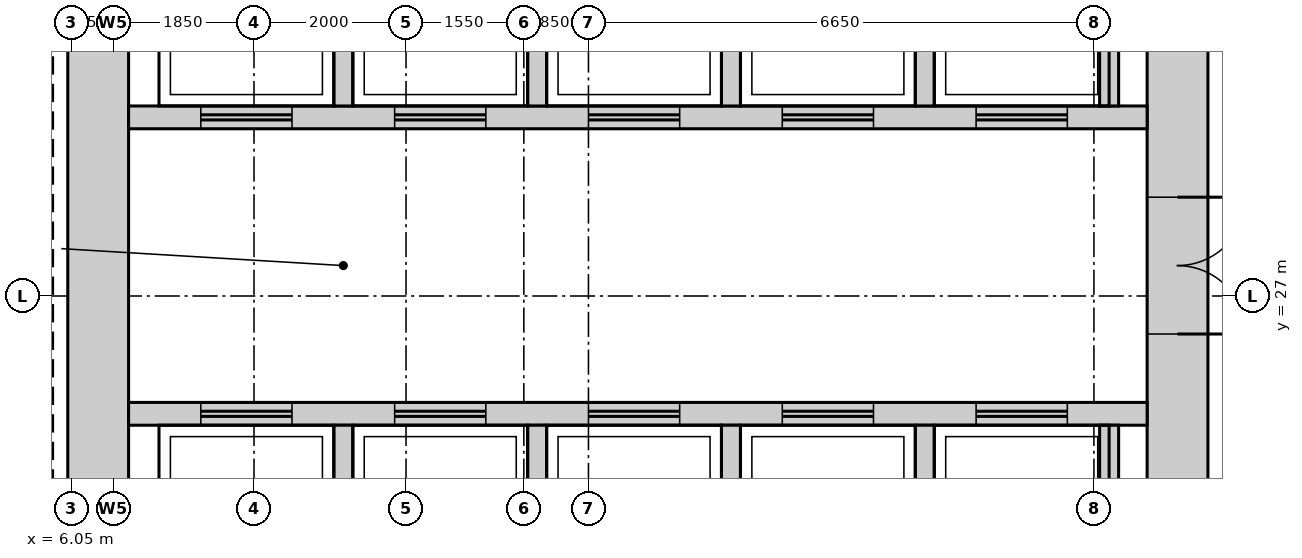
"""IFC4 building model, lengths in metres.
Left out: names, types, materials, properties, quantities, classifications, styles, units other than length and angle.
Written with IfcOpenShell. Run it as: python <this file> out.ifc"""

import sys

from ifc_helpers import new_model, si_unit, direction, frame, frame_2d, origin, place, context, subcontext, project, spatial, rectangle, extrude, source, transform, mapped, element, fill, save


model = new_model("IFC4")
c1 = context("Model", 3, precision=1e-05, world=origin(), true_north=direction((0.0, 1.0)))
c2 = subcontext(c1, "Body", "Model", "MODEL_VIEW")
j1 = project(units=[si_unit("LENGTHUNIT", "METRE"), si_unit("PLANEANGLEUNIT", "RADIAN")], contexts=[c1])
p1 = place(None, origin())
s1 = spatial("IfcSite", under=j1, at=p1, CompositionType="ELEMENT")
p2 = place(p1, origin())
s2 = spatial("IfcBuilding", under=s1, at=p2, CompositionType="ELEMENT")
p3 = place(p2, frame((0.0, 0.0, 168.7)))
s3 = spatial("IfcBuildingStorey", under=s2, at=p3, CompositionType="ELEMENT", Elevation=168.7)
m1 = source(origin(), c2, "Body", "SweptSolid", [
    extrude(rectangle(XDim=22.4, YDim=0.8, at=frame_2d((11.2, 0.0))), origin(), (0.0, 0.0, 1.0), 3.75),
])
p4 = place(p3, frame((20.6, 15.8, 0.0), z_axis=(0.0, 0.0, 1.0), x_axis=(0.0, 1.0, 0.0)))
e1 = element("IfcWall", 1, at=p4, inside=s3, PredefinedType="SHEAR", context=c2, shape_type="MappedRepresentation", body=[
    mapped(m1, transform((0.0, 0.0, 0.0))),
])
m2 = source(origin(), c2, "Body", "SweptSolid", [
    extrude(rectangle(XDim=1.8, YDim=2.1, at=frame_2d((0.9, 1.05))), frame((0.0, 0.41, 0.0), z_axis=(0.0, -1.0, 0.0), x_axis=(1.0, 0.0, 0.0)), (0.0, 0.0, 1.0), 0.82),
])
p5 = place(p4, frame((10.7, 0.0, 0.0)))
e2 = element("IfcOpeningElement", 2, at=p5, cuts=e1, PredefinedType="OPENING", context=c2, shape_type="MappedRepresentation", body=[
    mapped(m2, transform((0.0, 0.0, 0.0))),
])
m3 = source(origin(), c2, "Body", "SweptSolid", [
    extrude(rectangle(XDim=0.9, YDim=2.1, at=frame_2d((0.45, 1.05))), frame((0.0, 0.41, 0.0), z_axis=(0.0, -1.0, 0.0), x_axis=(1.0, 0.0, 0.0)), (0.0, 0.0, 1.0), 0.82),
])
p6 = place(p4, frame((0.35, 0.0, 0.0)))
e3 = element("IfcOpeningElement", 3, at=p6, cuts=e1, PredefinedType="OPENING", context=c2, shape_type="MappedRepresentation", body=[
    mapped(m3, transform((0.0, 0.0, 0.0))),
])
p7 = place(p4, frame((2.8, 0.0, 0.0)))
e4 = element("IfcOpeningElement", 4, at=p7, cuts=e1, PredefinedType="OPENING", context=c2, shape_type="MappedRepresentation", body=[
    mapped(m3, transform((0.0, 0.0, 0.0))),
])
p8 = place(p4, frame((5.55, 0.0, 0.0)))
e5 = element("IfcOpeningElement", 5, at=p8, cuts=e1, PredefinedType="OPENING", context=c2, shape_type="MappedRepresentation", body=[
    mapped(m3, transform((0.0, 0.0, 0.0))),
])
p9 = place(p3, frame((6.4, 15.8, 0.0), z_axis=(0.0, 0.0, 1.0), x_axis=(0.0, 1.0, 0.0)))
e6 = element("IfcWall", 6, at=p9, inside=s3, PredefinedType="SHEAR", context=c2, shape_type="MappedRepresentation", body=[
    mapped(m1, transform((0.0, 0.0, 0.0))),
])
m4 = source(origin(), c2, "Body", "SweptSolid", [
    extrude(rectangle(XDim=13.4, YDim=0.3, at=frame_2d((6.7, 0.0))), origin(), (0.0, 0.0, 1.0), 3.75),
])
p10 = place(p3, frame((6.8, 29.35, 0.0), z_axis=(0.0, 0.0, 1.0), x_axis=(1.0, 0.0, 0.0)))
e7 = element("IfcWall", 7, at=p10, inside=s3, PredefinedType="STANDARD", context=c2, shape_type="MappedRepresentation", body=[
    mapped(m4, transform((0.0, 0.0, 0.0))),
])
m5 = source(origin(), c2, "Body", "SweptSolid", [
    extrude(rectangle(XDim=1.2, YDim=2.1, at=frame_2d((0.6, 1.05))), frame((0.0, 0.16, 0.0), z_axis=(0.0, -1.0, 0.0), x_axis=(1.0, 0.0, 0.0)), (0.0, 0.0, 1.0), 0.32),
])
p11 = place(p10, frame((0.95, 0.0, 0.0)))
e8 = element("IfcOpeningElement", 8, at=p11, cuts=e7, PredefinedType="OPENING", context=c2, shape_type="MappedRepresentation", body=[
    mapped(m5, transform((0.0, 0.0, 0.0))),
])
p12 = place(p10, frame((3.5, 0.0, 0.0)))
e9 = element("IfcOpeningElement", 9, at=p12, cuts=e7, PredefinedType="OPENING", context=c2, shape_type="MappedRepresentation", body=[
    mapped(m5, transform((0.0, 0.0, 0.0))),
])
p13 = place(p10, frame((6.05, 0.0, 0.0)))
e10 = element("IfcOpeningElement", 10, at=p13, cuts=e7, PredefinedType="OPENING", context=c2, shape_type="MappedRepresentation", body=[
    mapped(m5, transform((0.0, 0.0, 0.0))),
])
p14 = place(p10, frame((8.6, 0.0, 0.0)))
e11 = element("IfcOpeningElement", 11, at=p14, cuts=e7, PredefinedType="OPENING", context=c2, shape_type="MappedRepresentation", body=[
    mapped(m5, transform((0.0, 0.0, 0.0))),
])
p15 = place(p10, frame((11.15, 0.0, 0.0)))
e12 = element("IfcOpeningElement", 12, at=p15, cuts=e7, PredefinedType="OPENING", context=c2, shape_type="MappedRepresentation", body=[
    mapped(m5, transform((0.0, 0.0, 0.0))),
])
p16 = place(p3, frame((6.8, 25.45, 0.0), z_axis=(0.0, 0.0, 1.0), x_axis=(1.0, 0.0, 0.0)))
e13 = element("IfcWall", 13, at=p16, inside=s3, PredefinedType="STANDARD", context=c2, shape_type="MappedRepresentation", body=[
    mapped(m4, transform((0.0, 0.0, 0.0))),
])
p17 = place(p16, frame((0.95, 0.0, 0.0)))
e14 = element("IfcOpeningElement", 14, at=p17, cuts=e13, PredefinedType="OPENING", context=c2, shape_type="MappedRepresentation", body=[
    mapped(m5, transform((0.0, 0.0, 0.0))),
])
p18 = place(p16, frame((3.5, 0.0, 0.0)))
e15 = element("IfcOpeningElement", 15, at=p18, cuts=e13, PredefinedType="OPENING", context=c2, shape_type="MappedRepresentation", body=[
    mapped(m5, transform((0.0, 0.0, 0.0))),
])
p19 = place(p16, frame((6.05, 0.0, 0.0)))
e16 = element("IfcOpeningElement", 16, at=p19, cuts=e13, PredefinedType="OPENING", context=c2, shape_type="MappedRepresentation", body=[
    mapped(m5, transform((0.0, 0.0, 0.0))),
])
p20 = place(p16, frame((8.6, 0.0, 0.0)))
e17 = element("IfcOpeningElement", 17, at=p20, cuts=e13, PredefinedType="OPENING", context=c2, shape_type="MappedRepresentation", body=[
    mapped(m5, transform((0.0, 0.0, 0.0))),
])
p21 = place(p16, frame((11.15, 0.0, 0.0)))
e18 = element("IfcOpeningElement", 18, at=p21, cuts=e13, PredefinedType="OPENING", context=c2, shape_type="MappedRepresentation", body=[
    mapped(m5, transform((0.0, 0.0, 0.0))),
])
m6 = source(origin(), c2, "Body", "SweptSolid", [
    extrude(rectangle(XDim=2.4, YDim=0.25, at=frame_2d((1.2, 0.0))), origin(), (0.0, 0.0, 1.0), 3.75),
])
for number, where, z_axis, x_axis in (
    (19, (17.275, 29.5, 0.0), (0.0, 0.0, 1.0), (0.0, 1.0, 0.0)),
    (20, (19.7, 29.5, 0.0), (0.0, 0.0, 1.0), (0.0, 1.0, 0.0)),
    (21, (9.625, 29.5, 0.0), (0.0, 0.0, 1.0), (0.0, 1.0, 0.0)),
    (22, (12.175, 29.5, 0.0), (0.0, 0.0, 1.0), (0.0, 1.0, 0.0)),
    (23, (14.725, 29.5, 0.0), (0.0, 0.0, 1.0), (0.0, 1.0, 0.0)),
):
    element("IfcWall", number, at=place(p3, frame(where, z_axis=z_axis, x_axis=x_axis)), inside=s3, PredefinedType="STANDARD", context=c2, shape_type="MappedRepresentation", body=[
        mapped(m6, transform((0.0, 0.0, 0.0))),
    ])
m7 = source(origin(), c2, "Body", "SweptSolid", [
    extrude(rectangle(XDim=2.4, YDim=0.25, at=frame_2d((1.2, 0.0))), origin(), (0.0, 0.0, 1.0), 3.75),
])
for number, where, z_axis, x_axis in (
    (24, (17.275, 22.9, 0.0), (0.0, 0.0, 1.0), (0.0, 1.0, 0.0)),
    (25, (19.7, 22.9, 0.0), (0.0, 0.0, 1.0), (0.0, 1.0, 0.0)),
    (26, (9.625, 22.9, 0.0), (0.0, 0.0, 1.0), (0.0, 1.0, 0.0)),
    (27, (12.175, 22.9, 0.0), (0.0, 0.0, 1.0), (0.0, 1.0, 0.0)),
    (28, (14.725, 22.9, 0.0), (0.0, 0.0, 1.0), (0.0, 1.0, 0.0)),
):
    element("IfcWall", number, at=place(p3, frame(where, z_axis=z_axis, x_axis=x_axis)), inside=s3, PredefinedType="STANDARD", context=c2, shape_type="MappedRepresentation", body=[
        mapped(m7, transform((0.0, 0.0, 0.0))),
    ])
m8 = source(origin(), c2, "Body", "SweptSolid", [
    extrude(rectangle(XDim=1.8, YDim=2.1, at=frame_2d((0.9, 1.05))), frame((0.0, 0.35, 0.0), z_axis=(0.0, -1.0, 0.0), x_axis=(1.0, 0.0, 0.0)), (0.0, 0.0, 1.0), 0.7),
])
p22 = place(p5, origin())
e29 = element("IfcDoor", 29, at=p22, inside=s3, OperationType="DOUBLE_DOOR_SINGLE_SWING", PredefinedType="DOOR", context=c2, shape_type="MappedRepresentation", body=[
    mapped(m8, transform((0.0, 0.0, 0.0))),
])
fill(e2, e29)
m9 = source(origin(), c2, "Body", "SweptSolid", [
    extrude(rectangle(XDim=1.2, YDim=2.1, at=frame_2d((0.6, 1.05))), frame((0.0, 0.025, 0.0), z_axis=(0.0, -1.0, 0.0), x_axis=(1.0, 0.0, 0.0)), (0.0, 0.0, 1.0), 0.05),
])
p23 = place(p17, origin())
e30 = element("IfcDoor", 30, at=p23, inside=s3, OperationType="DOUBLE_DOOR_SLIDING", PredefinedType="DOOR", context=c2, shape_type="MappedRepresentation", body=[
    mapped(m9, transform((0.0, 0.0, 0.0))),
])
fill(e14, e30)
p24 = place(p18, origin())
e31 = element("IfcDoor", 31, at=p24, inside=s3, OperationType="DOUBLE_DOOR_SLIDING", PredefinedType="DOOR", context=c2, shape_type="MappedRepresentation", body=[
    mapped(m9, transform((0.0, 0.0, 0.0))),
])
fill(e15, e31)
p25 = place(p19, origin())
e32 = element("IfcDoor", 32, at=p25, inside=s3, OperationType="DOUBLE_DOOR_SLIDING", PredefinedType="DOOR", context=c2, shape_type="MappedRepresentation", body=[
    mapped(m9, transform((0.0, 0.0, 0.0))),
])
fill(e16, e32)
p26 = place(p20, origin())
e33 = element("IfcDoor", 33, at=p26, inside=s3, OperationType="DOUBLE_DOOR_SLIDING", PredefinedType="DOOR", context=c2, shape_type="MappedRepresentation", body=[
    mapped(m9, transform((0.0, 0.0, 0.0))),
])
fill(e17, e33)
p27 = place(p21, origin())
e34 = element("IfcDoor", 34, at=p27, inside=s3, OperationType="DOUBLE_DOOR_SLIDING", PredefinedType="DOOR", context=c2, shape_type="MappedRepresentation", body=[
    mapped(m9, transform((0.0, 0.0, 0.0))),
])
fill(e18, e34)
p28 = place(p11, origin())
e35 = element("IfcDoor", 35, at=p28, inside=s3, OperationType="DOUBLE_DOOR_SLIDING", PredefinedType="DOOR", context=c2, shape_type="MappedRepresentation", body=[
    mapped(m9, transform((0.0, 0.0, 0.0))),
])
fill(e8, e35)
p29 = place(p12, origin())
e36 = element("IfcDoor", 36, at=p29, inside=s3, OperationType="DOUBLE_DOOR_SLIDING", PredefinedType="DOOR", context=c2, shape_type="MappedRepresentation", body=[
    mapped(m9, transform((0.0, 0.0, 0.0))),
])
fill(e9, e36)
p30 = place(p13, origin())
e37 = element("IfcDoor", 37, at=p30, inside=s3, OperationType="DOUBLE_DOOR_SLIDING", PredefinedType="DOOR", context=c2, shape_type="MappedRepresentation", body=[
    mapped(m9, transform((0.0, 0.0, 0.0))),
])
fill(e10, e37)
p31 = place(p14, origin())
e38 = element("IfcDoor", 38, at=p31, inside=s3, OperationType="DOUBLE_DOOR_SLIDING", PredefinedType="DOOR", context=c2, shape_type="MappedRepresentation", body=[
    mapped(m9, transform((0.0, 0.0, 0.0))),
])
fill(e11, e38)
p32 = place(p15, origin())
e39 = element("IfcDoor", 39, at=p32, inside=s3, OperationType="DOUBLE_DOOR_SLIDING", PredefinedType="DOOR", context=c2, shape_type="MappedRepresentation", body=[
    mapped(m9, transform((0.0, 0.0, 0.0))),
])
fill(e12, e39)
save(model, sys.argv[1])
